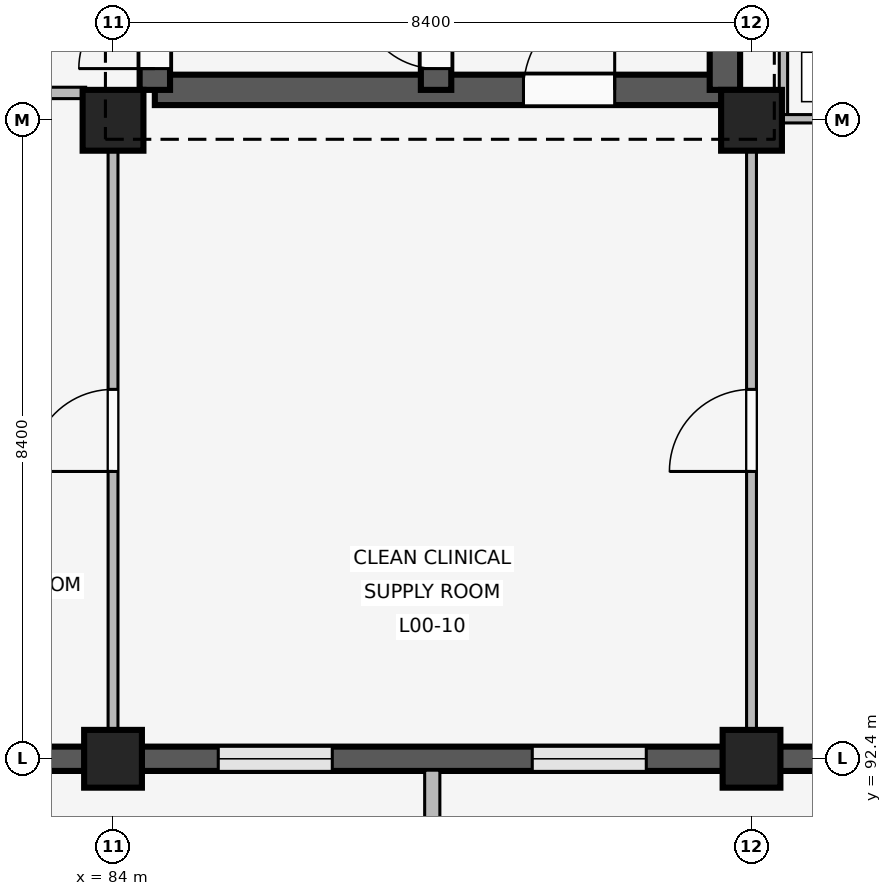
"""IFC4 building model, lengths in metres.
Left out: names, types, materials, properties, quantities, classifications, styles, units other than length and angle.
Written with IfcOpenShell. Run it as: python <this file> out.ifc"""

import sys

from ifc_helpers import new_model, si_unit, direction, frame, frame_2d, origin, origin_2d, place, context, subcontext, project, spatial, rectangle, extrude, element, fill, save


model = new_model("IFC4")
c1 = context("Model", 3, precision=1e-05, world=origin(), true_north=direction((0.0, 1.0)))
c2 = subcontext(c1, "Body", "Model", "MODEL_VIEW")
j1 = project(units=[si_unit("LENGTHUNIT", "METRE"), si_unit("PLANEANGLEUNIT", "RADIAN")], contexts=[c1])
p1 = place(None, origin())
s1 = spatial("IfcSite", under=j1, at=p1, CompositionType="ELEMENT")
p2 = place(p1, origin())
s2 = spatial("IfcBuilding", under=s1, at=p2, CompositionType="ELEMENT")
p3 = place(p2, origin())
s3 = spatial("IfcBuildingStorey", under=s2, at=p3, CompositionType="ELEMENT", Elevation=0.0)
p4 = place(p3, frame((84.0, 92.4, 0.0), z_axis=(0.0, 0.0, 1.0), x_axis=(1.0, 0.0, 0.0)))
e1 = element("IfcColumn", 1, at=p4, inside=s3, PredefinedType="COLUMN", context=c2, shape_type="SweptSolid", body=[
    extrude(rectangle(XDim=0.76, YDim=0.76, at=origin_2d()), origin(), (0.0, 0.0, 1.0), 4.8),
])
p5 = place(p3, frame((84.0, 100.8, 0.0), z_axis=(0.0, 0.0, 1.0), x_axis=(1.0, 0.0, 0.0)))
e2 = element("IfcColumn", 2, at=p5, inside=s3, PredefinedType="COLUMN", context=c2, shape_type="SweptSolid", body=[
    extrude(rectangle(XDim=0.8, YDim=0.8, at=origin_2d()), origin(), (0.0, 0.0, 1.0), 4.8),
])
p6 = place(p3, frame((92.4, 92.4, 0.0), z_axis=(0.0, 0.0, 1.0), x_axis=(1.0, 0.0, 0.0)))
e3 = element("IfcColumn", 3, at=p6, inside=s3, PredefinedType="COLUMN", context=c2, shape_type="SweptSolid", body=[
    extrude(rectangle(XDim=0.76, YDim=0.76, at=origin_2d()), origin(), (0.0, 0.0, 1.0), 4.8),
])
p7 = place(p3, frame((92.4, 100.8, 0.0), z_axis=(0.0, 0.0, 1.0), x_axis=(1.0, 0.0, 0.0)))
e4 = element("IfcColumn", 4, at=p7, inside=s3, PredefinedType="COLUMN", context=c2, shape_type="SweptSolid", body=[
    extrude(rectangle(XDim=0.8, YDim=0.8, at=origin_2d()), origin(), (0.0, 0.0, 1.0), 4.8),
])
p8 = place(p3, frame((83.625, 92.4, 0.0), z_axis=(0.0, 0.0, 1.0), x_axis=(-1.0, 0.0, 0.0)))
e5 = element("IfcWall", 5, at=p8, inside=s3, PredefinedType="SOLIDWALL", context=c2, shape_type="SweptSolid", body=[
    extrude(rectangle(XDim=7.65, YDim=0.32, at=frame_2d((3.825, 0.0))), origin(), (0.0, 0.0, 1.0), 3.82),
])
p9 = place(p8, frame((0.52, 0.0, 0.85)))
e6 = element("IfcOpeningElement", 6, at=p9, cuts=e5, PredefinedType="OPENING", context=c2, shape_type="SweptSolid", body=[
    extrude(rectangle(XDim=1.4, YDim=1.4, at=frame_2d((0.7, 0.7))), frame((0.0, 0.17, 0.0), z_axis=(0.0, -1.0, 0.0), x_axis=(1.0, 0.0, 0.0)), (0.0, 0.0, 1.0), 0.34),
])
p10 = place(p8, frame((5.19, 0.0, 0.85)))
e7 = element("IfcOpeningElement", 7, at=p10, cuts=e5, PredefinedType="OPENING", context=c2, shape_type="SweptSolid", body=[
    extrude(rectangle(XDim=1.4, YDim=1.4, at=frame_2d((0.7, 0.7))), frame((0.0, 0.17, 0.0), z_axis=(0.0, -1.0, 0.0), x_axis=(1.0, 0.0, 0.0)), (0.0, 0.0, 1.0), 0.34),
])
p11 = place(p3, frame((92.025, 92.4, 0.0), z_axis=(0.0, 0.0, 1.0), x_axis=(-1.0, 0.0, 0.0)))
e8 = element("IfcWall", 8, at=p11, inside=s3, PredefinedType="SOLIDWALL", context=c2, shape_type="SweptSolid", body=[
    extrude(rectangle(XDim=7.65, YDim=0.32, at=frame_2d((3.825, 0.0))), origin(), (0.0, 0.0, 1.0), 3.82),
])
p12 = place(p11, frame((1.01, 0.0, 0.85)))
e9 = element("IfcOpeningElement", 9, at=p12, cuts=e8, PredefinedType="OPENING", context=c2, shape_type="SweptSolid", body=[
    extrude(rectangle(XDim=1.5, YDim=1.55, at=frame_2d((0.75, 0.775))), frame((0.0, 0.17, 0.0), z_axis=(0.0, -1.0, 0.0), x_axis=(1.0, 0.0, 0.0)), (0.0, 0.0, 1.0), 0.34),
])
p13 = place(p11, frame((5.14, 0.0, 0.85)))
e10 = element("IfcOpeningElement", 10, at=p13, cuts=e8, PredefinedType="OPENING", context=c2, shape_type="SweptSolid", body=[
    extrude(rectangle(XDim=1.5, YDim=1.55, at=frame_2d((0.75, 0.775))), frame((0.0, 0.17, 0.0), z_axis=(0.0, -1.0, 0.0), x_axis=(1.0, 0.0, 0.0)), (0.0, 0.0, 1.0), 0.34),
])
p14 = place(p3, frame((88.2, 92.25, 0.0), z_axis=(0.0, 0.0, 1.0), x_axis=(0.0, -1.0, 0.0)))
e11 = element("IfcWall", 11, at=p14, inside=s3, PredefinedType="ELEMENTEDWALL", context=c2, shape_type="SweptSolid", body=[
    extrude(rectangle(XDim=0.85, YDim=0.2, at=frame_2d((0.425, 0.0))), origin(), (0.0, 0.0, 1.0), 3.8),
])
p15 = place(p3, frame((100.425, 92.4, 0.0), z_axis=(0.0, 0.0, 1.0), x_axis=(-1.0, 0.0, 0.0)))
e12 = element("IfcWall", 12, at=p15, inside=s3, PredefinedType="SOLIDWALL", context=c2, shape_type="SweptSolid", body=[
    extrude(rectangle(XDim=7.65, YDim=0.32, at=frame_2d((3.825, 0.0))), origin(), (0.0, 0.0, 1.0), 3.82),
])
p16 = place(p15, frame((1.08, 0.0, 0.85)))
e13 = element("IfcOpeningElement", 13, at=p16, cuts=e12, PredefinedType="OPENING", context=c2, shape_type="SweptSolid", body=[
    extrude(rectangle(XDim=1.36, YDim=1.42, at=frame_2d((0.68, 0.71))), frame((0.0, 0.17, 0.0), z_axis=(0.0, -1.0, 0.0), x_axis=(1.0, 0.0, 0.0)), (0.0, 0.0, 1.0), 0.34),
])
p17 = place(p15, frame((5.21, 0.0, 0.85)))
e14 = element("IfcOpeningElement", 14, at=p17, cuts=e12, PredefinedType="OPENING", context=c2, shape_type="SweptSolid", body=[
    extrude(rectangle(XDim=1.36, YDim=1.42, at=frame_2d((0.68, 0.71))), frame((0.0, 0.17, 0.0), z_axis=(0.0, -1.0, 0.0), x_axis=(1.0, 0.0, 0.0)), (0.0, 0.0, 1.0), 0.34),
])
p18 = place(p3, frame((84.55, 101.2, 0.0), z_axis=(0.0, 0.0, 1.0), x_axis=(1.0, 0.0, 0.0)))
e15 = element("IfcWall", 15, at=p18, inside=s3, PredefinedType="SHEAR", context=c2, shape_type="SweptSolid", body=[
    extrude(rectangle(XDim=7.5, YDim=0.4, at=frame_2d((3.75, 0.0))), origin(), (0.0, 0.0, 1.0), 4.52),
])
p19 = place(p18, frame((4.85, 0.0, 0.0)))
e16 = element("IfcOpeningElement", 16, at=p19, cuts=e15, PredefinedType="OPENING", context=c2, shape_type="SweptSolid", body=[
    extrude(rectangle(XDim=1.2, YDim=2.2, at=frame_2d((0.6, 1.1))), frame((0.0, 0.21, 0.0), z_axis=(0.0, -1.0, 0.0), x_axis=(1.0, 0.0, 0.0)), (0.0, 0.0, 1.0), 0.42),
])
p20 = place(p3, frame((84.55, 101.2, 0.0), z_axis=(0.0, 0.0, 1.0), x_axis=(0.0, 1.0, 0.0)))
e17 = element("IfcWall", 17, at=p20, inside=s3, PredefinedType="SHEAR", context=c2, shape_type="SweptSolid", body=[
    extrude(rectangle(XDim=7.55, YDim=0.4, at=frame_2d((3.775, 0.0))), origin(), (0.0, 0.0, 1.0), 4.52),
])
p21 = place(p20, frame((0.28, 0.0, 0.0)))
e18 = element("IfcOpeningElement", 18, at=p21, cuts=e17, PredefinedType="OPENING", context=c2, shape_type="SweptSolid", body=[
    extrude(rectangle(XDim=1.0, YDim=2.15, at=frame_2d((0.5, 1.075))), frame((0.0, 0.21, 0.0), z_axis=(0.0, -1.0, 0.0), x_axis=(1.0, 0.0, 0.0)), (0.0, 0.0, 1.0), 0.42),
])
p22 = place(p3, frame((92.05, 101.2, 0.0), z_axis=(0.0, 0.0, 1.0), x_axis=(0.0, 1.0, 0.0)))
e19 = element("IfcWall", 19, at=p22, inside=s3, PredefinedType="SHEAR", context=c2, shape_type="SweptSolid", body=[
    extrude(rectangle(XDim=7.55, YDim=0.4, at=frame_2d((3.775, 0.0))), origin(), (0.0, 0.0, 1.0), 4.52),
])
p23 = place(p22, frame((2.4, 0.0, 0.0)))
e20 = element("IfcOpeningElement", 20, at=p23, cuts=e19, PredefinedType="OPENING", context=c2, shape_type="SweptSolid", body=[
    extrude(rectangle(XDim=1.2, YDim=2.2, at=frame_2d((0.6, 1.1))), frame((0.0, 0.21, 0.0), z_axis=(0.0, -1.0, 0.0), x_axis=(1.0, 0.0, 0.0)), (0.0, 0.0, 1.0), 0.42),
])
p24 = place(p3, frame((88.25, 101.2, 0.0), z_axis=(0.0, 0.0, 1.0), x_axis=(0.0, 1.0, 0.0)))
e21 = element("IfcWall", 21, at=p24, inside=s3, PredefinedType="SHEAR", context=c2, shape_type="SweptSolid", body=[
    extrude(rectangle(XDim=7.55, YDim=0.4, at=frame_2d((3.775, 0.0))), origin(), (0.0, 0.0, 1.0), 4.52),
])
p25 = place(p24, frame((0.28, 0.0, 0.0)))
e22 = element("IfcOpeningElement", 22, at=p25, cuts=e21, PredefinedType="OPENING", context=c2, shape_type="SweptSolid", body=[
    extrude(rectangle(XDim=1.0, YDim=2.15, at=frame_2d((0.5, 1.075))), frame((0.0, 0.21, 0.0), z_axis=(0.0, -1.0, 0.0), x_axis=(1.0, 0.0, 0.0)), (0.0, 0.0, 1.0), 0.42),
])
p26 = place(p3, frame((81.46, 101.16, 0.0), z_axis=(0.0, 0.0, 1.0), x_axis=(1.0, 0.0, 0.0)))
e23 = element("IfcWall", 23, at=p26, inside=s3, PredefinedType="PARTITIONING", context=c2, shape_type="SweptSolid", body=[
    extrude(rectangle(XDim=2.18, YDim=0.15, at=frame_2d((1.09, 0.0))), origin(), (0.0, 0.0, 1.0), 3.8),
])
p27 = place(p26, frame((0.5, 0.0, 0.0)))
e24 = element("IfcOpeningElement", 24, at=p27, cuts=e23, PredefinedType="OPENING", context=c2, shape_type="SweptSolid", body=[
    extrude(rectangle(XDim=1.08, YDim=2.15, at=frame_2d((0.54, 1.075))), frame((0.0, 0.085, 0.0), z_axis=(0.0, -1.0, 0.0), x_axis=(1.0, 0.0, 0.0)), (0.0, 0.0, 1.0), 0.17),
])
p28 = place(p3, frame((84.0, 92.54, 0.0), z_axis=(0.0, 0.0, 1.0), x_axis=(0.0, 1.0, 0.0)))
e25 = element("IfcWall", 25, at=p28, inside=s3, PredefinedType="PARTITIONING", context=c2, shape_type="SweptSolid", body=[
    extrude(rectangle(XDim=8.21, YDim=0.13, at=frame_2d((4.105, 0.0))), origin(), (0.0, 0.0, 1.0), 3.8),
])
p29 = place(p28, frame((3.64, 0.0, 0.0)))
e26 = element("IfcOpeningElement", 26, at=p29, cuts=e25, PredefinedType="OPENING", context=c2, shape_type="SweptSolid", body=[
    extrude(rectangle(XDim=1.08, YDim=2.15, at=frame_2d((0.54, 1.075))), frame((0.0, 0.075, 0.0), z_axis=(0.0, -1.0, 0.0), x_axis=(1.0, 0.0, 0.0)), (0.0, 0.0, 1.0), 0.15),
])
p30 = place(p3, frame((92.4, 92.54, 0.0), z_axis=(0.0, 0.0, 1.0), x_axis=(0.0, 1.0, 0.0)))
e27 = element("IfcWall", 27, at=p30, inside=s3, PredefinedType="PARTITIONING", context=c2, shape_type="SweptSolid", body=[
    extrude(rectangle(XDim=8.21, YDim=0.13, at=frame_2d((4.105, 0.0))), origin(), (0.0, 0.0, 1.0), 3.8),
])
p31 = place(p30, frame((3.64, 0.0, 0.0)))
e28 = element("IfcOpeningElement", 28, at=p31, cuts=e27, PredefinedType="OPENING", context=c2, shape_type="SweptSolid", body=[
    extrude(rectangle(XDim=1.08, YDim=2.15, at=frame_2d((0.54, 1.075))), frame((0.0, 0.075, 0.0), z_axis=(0.0, -1.0, 0.0), x_axis=(1.0, 0.0, 0.0)), (0.0, 0.0, 1.0), 0.15),
])
p32 = place(p3, frame((92.82, 100.82, 0.0), z_axis=(0.0, 0.0, 1.0), x_axis=(0.0, 1.0, 0.0)))
e29 = element("IfcWall", 29, at=p32, inside=s3, PredefinedType="PARTITIONING", context=c2, shape_type="SweptSolid", body=[
    extrude(rectangle(XDim=2.61, YDim=0.11, at=frame_2d((1.305, 0.0))), origin(), (0.0, 0.0, 1.0), 3.8),
])
p33 = place(p3, frame((92.82, 100.82, 0.0), z_axis=(0.0, 0.0, 1.0), x_axis=(1.0, 0.0, 0.0)))
e30 = element("IfcWall", 30, at=p33, inside=s3, PredefinedType="PARTITIONING", context=c2, shape_type="SweptSolid", body=[
    extrude(rectangle(XDim=1.98, YDim=0.11, at=frame_2d((0.99, 0.0))), origin(), (0.0, 0.0, 1.0), 3.8),
])
p34 = place(p33, frame((0.54, 0.0, 0.0)))
e31 = element("IfcOpeningElement", 31, at=p34, cuts=e30, PredefinedType="OPENING", context=c2, shape_type="SweptSolid", body=[
    extrude(rectangle(XDim=0.9, YDim=2.1, at=frame_2d((0.45, 1.05))), frame((0.0, 0.065, 0.0), z_axis=(0.0, -1.0, 0.0), x_axis=(1.0, 0.0, 0.0)), (0.0, 0.0, 1.0), 0.13),
])
p35 = place(p12, origin())
e32 = element("IfcWindow", 32, at=p35, inside=s3, PartitioningType="SINGLE_PANEL", PredefinedType="WINDOW", context=c2, shape_type="SweptSolid", body=[
    extrude(rectangle(XDim=1.5, YDim=1.55, at=frame_2d((0.75, 0.775))), frame((0.0, 0.03, 0.0), z_axis=(0.0, -1.0, 0.0), x_axis=(1.0, 0.0, 0.0)), (0.0, 0.0, 1.0), 0.06),
])
fill(e9, e32)
p36 = place(p13, origin())
e33 = element("IfcWindow", 33, at=p36, inside=s3, PartitioningType="SINGLE_PANEL", PredefinedType="WINDOW", context=c2, shape_type="SweptSolid", body=[
    extrude(rectangle(XDim=1.5, YDim=1.55, at=frame_2d((0.75, 0.775))), frame((0.0, 0.03, 0.0), z_axis=(0.0, -1.0, 0.0), x_axis=(1.0, 0.0, 0.0)), (0.0, 0.0, 1.0), 0.06),
])
fill(e10, e33)
p37 = place(p19, origin())
e34 = element("IfcDoor", 34, at=p37, inside=s3, OperationType="SINGLE_SWING_RIGHT", PredefinedType="DOOR", context=c2, shape_type="SweptSolid", body=[
    extrude(rectangle(XDim=1.2, YDim=2.2, at=frame_2d((0.6, 1.1))), frame((0.0, 0.025, 0.0), z_axis=(0.0, -1.0, 0.0), x_axis=(1.0, 0.0, 0.0)), (0.0, 0.0, 1.0), 0.05),
])
fill(e16, e34)
p38 = place(p21, origin())
e35 = element("IfcDoor", 35, at=p38, inside=s3, OperationType="SINGLE_SWING_LEFT", PredefinedType="DOOR", context=c2, shape_type="SweptSolid", body=[
    extrude(rectangle(XDim=1.0, YDim=2.15, at=frame_2d((0.5, 1.075))), frame((0.0, 0.025, 0.0), z_axis=(0.0, -1.0, 0.0), x_axis=(1.0, 0.0, 0.0)), (0.0, 0.0, 1.0), 0.05),
])
fill(e18, e35)
p39 = place(p25, origin())
e36 = element("IfcDoor", 36, at=p39, inside=s3, OperationType="SINGLE_SWING_RIGHT", PredefinedType="DOOR", context=c2, shape_type="SweptSolid", body=[
    extrude(rectangle(XDim=1.0, YDim=2.15, at=frame_2d((0.5, 1.075))), frame((0.0, 0.025, 0.0), z_axis=(0.0, -1.0, 0.0), x_axis=(1.0, 0.0, 0.0)), (0.0, 0.0, 1.0), 0.05),
])
fill(e22, e36)
p40 = place(p29, origin())
e37 = element("IfcDoor", 37, at=p40, inside=s3, OperationType="SINGLE_SWING_LEFT", PredefinedType="DOOR", context=c2, shape_type="SweptSolid", body=[
    extrude(rectangle(XDim=1.08, YDim=2.15, at=frame_2d((0.54, 1.075))), frame((0.0, 0.025, 0.0), z_axis=(0.0, -1.0, 0.0), x_axis=(1.0, 0.0, 0.0)), (0.0, 0.0, 1.0), 0.05),
])
fill(e26, e37)
p41 = place(p31, origin())
e38 = element("IfcDoor", 38, at=p41, inside=s3, OperationType="SINGLE_SWING_LEFT", PredefinedType="DOOR", context=c2, shape_type="SweptSolid", body=[
    extrude(rectangle(XDim=1.08, YDim=2.15, at=frame_2d((0.54, 1.075))), frame((0.0, 0.025, 0.0), z_axis=(0.0, -1.0, 0.0), x_axis=(1.0, 0.0, 0.0)), (0.0, 0.0, 1.0), 0.05),
])
fill(e28, e38)
save(model, sys.argv[1])
